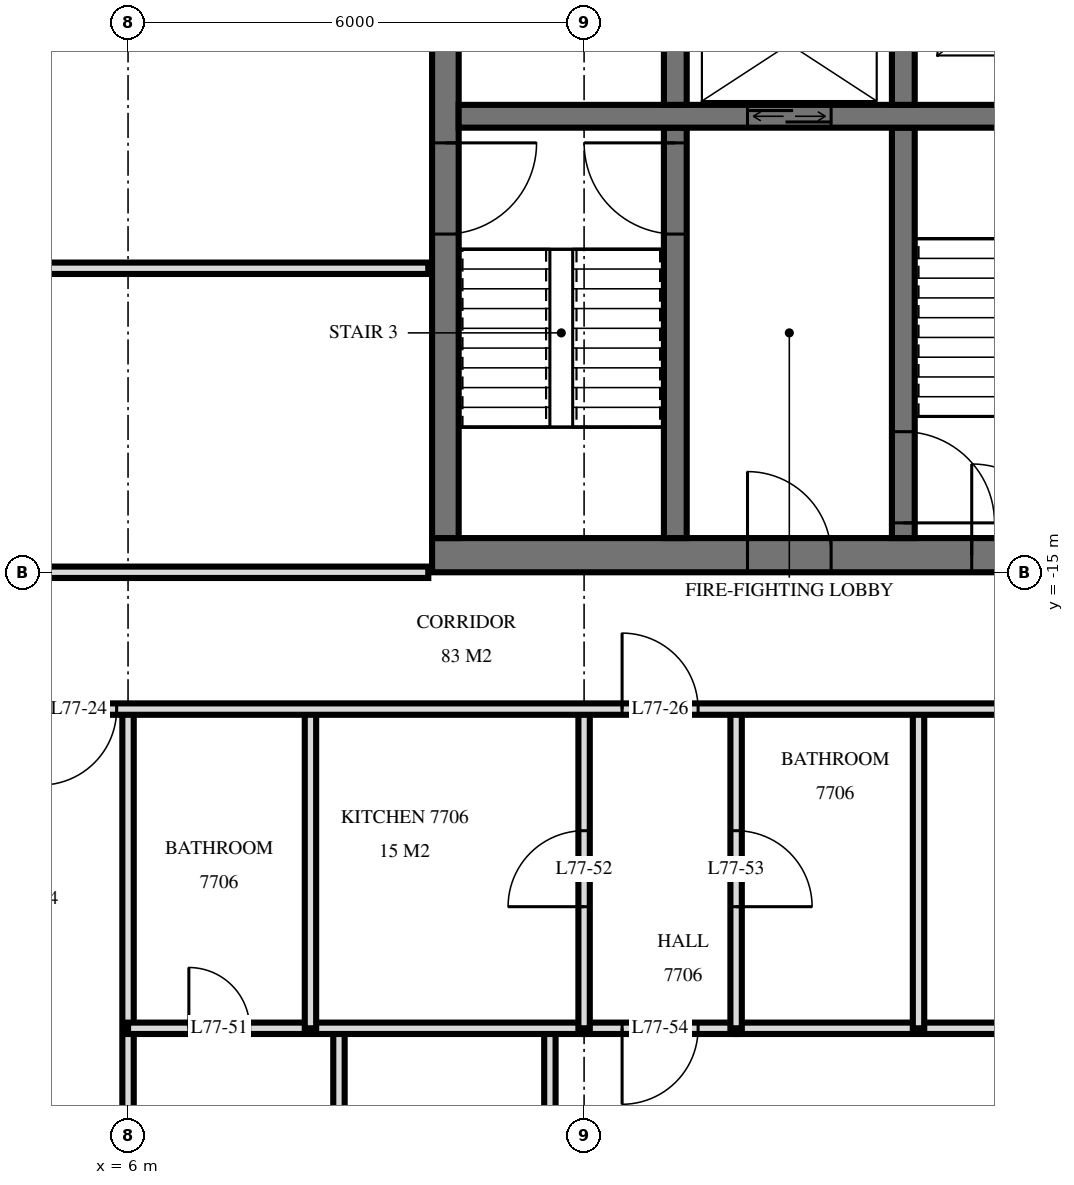
"""IFC4 building model, lengths in metres.
Left out: names, types, materials, properties, quantities, classifications, styles, units other than length and angle.
Written with IfcOpenShell. Run it as: python <this file> out.ifc"""

import sys

from ifc_helpers import new_model, si_unit, direction, frame, frame_2d, origin, place, context, subcontext, project, spatial, rectangle, extrude, element, fill, save


model = new_model("IFC4")
c1 = context("Model", 3, precision=1e-05, world=origin(), true_north=direction((0.0, 1.0)))
c2 = subcontext(c1, "Body", "Model", "MODEL_VIEW")
j1 = project(units=[si_unit("LENGTHUNIT", "METRE"), si_unit("PLANEANGLEUNIT", "RADIAN")], contexts=[c1])
p1 = place(None, origin())
s1 = spatial("IfcSite", under=j1, at=p1, CompositionType="ELEMENT")
p2 = place(p1, origin())
s2 = spatial("IfcBuilding", under=s1, at=p2, CompositionType="ELEMENT")
p3 = place(p2, frame((0.0, 0.0, 291.1)))
s3 = spatial("IfcBuildingStorey", under=s2, at=p3, CompositionType="ELEMENT", Elevation=291.1)
p4 = place(p3, frame((10.0, -14.775, 0.0), z_axis=(0.0, 0.0, 1.0), x_axis=(1.0, 0.0, 0.0)))
e1 = element("IfcWall", 1, at=p4, inside=s3, PredefinedType="SHEAR", context=c2, shape_type="SweptSolid", body=[
    extrude(rectangle(XDim=9.5, YDim=0.45, at=frame_2d((4.75, 0.0))), origin(), (0.0, 0.0, 1.0), 3.5),
])
p5 = place(p4, frame((7.1, 0.0, 0.0)))
e2 = element("IfcOpeningElement", 2, at=p5, cuts=e1, PredefinedType="OPENING", context=c2, shape_type="SweptSolid", body=[
    extrude(rectangle(XDim=1.2, YDim=2.1, at=frame_2d((0.6, 1.05))), frame((0.0, 0.235, 0.0), z_axis=(0.0, -1.0, 0.0), x_axis=(1.0, 0.0, 0.0)), (0.0, 0.0, 1.0), 0.47),
])
p6 = place(p4, frame((4.15, 0.0, 0.0)))
e3 = element("IfcOpeningElement", 3, at=p6, cuts=e1, PredefinedType="OPENING", context=c2, shape_type="SweptSolid", body=[
    extrude(rectangle(XDim=1.1, YDim=2.1, at=frame_2d((0.55, 1.05))), frame((0.0, 0.235, 0.0), z_axis=(0.0, -1.0, 0.0), x_axis=(1.0, 0.0, 0.0)), (0.0, 0.0, 1.0), 0.47),
])
p7 = place(p3, frame((10.175, -14.55, 0.0), z_axis=(0.0, 0.0, 1.0), x_axis=(0.0, 1.0, 0.0)))
e4 = element("IfcWall", 4, at=p7, inside=s3, PredefinedType="SHEAR", context=c2, shape_type="SweptSolid", body=[
    extrude(rectangle(XDim=14.1, YDim=0.35, at=frame_2d((7.05, 0.0))), origin(), (0.0, 0.0, 1.0), 3.5),
])
p8 = place(p7, frame((8.4, 0.0, 0.0)))
e5 = element("IfcOpeningElement", 5, at=p8, cuts=e4, PredefinedType="OPENING", context=c2, shape_type="SweptSolid", body=[
    extrude(rectangle(XDim=1.4, YDim=2.4, at=frame_2d((0.7, 1.2))), frame((0.0, 0.185, 0.0), z_axis=(0.0, -1.0, 0.0), x_axis=(1.0, 0.0, 0.0)), (0.0, 0.0, 1.0), 0.37),
])
p9 = place(p7, frame((10.0, 0.0, 0.0)))
e6 = element("IfcOpeningElement", 6, at=p9, cuts=e4, PredefinedType="OPENING", context=c2, shape_type="SweptSolid", body=[
    extrude(rectangle(XDim=1.4, YDim=2.4, at=frame_2d((0.7, 1.2))), frame((0.0, 0.185, 0.0), z_axis=(0.0, -1.0, 0.0), x_axis=(1.0, 0.0, 0.0)), (0.0, 0.0, 1.0), 0.37),
])
p10 = place(p7, frame((4.0, 0.0, 0.0)))
e7 = element("IfcOpeningElement", 7, at=p10, cuts=e4, PredefinedType="OPENING", context=c2, shape_type="SweptSolid", body=[
    extrude(rectangle(XDim=1.2, YDim=2.1, at=frame_2d((0.6, 1.05))), frame((0.0, 0.185, 0.0), z_axis=(0.0, -1.0, 0.0), x_axis=(1.0, 0.0, 0.0)), (0.0, 0.0, 1.0), 0.37),
])
p11 = place(p3, frame((10.35, -9.0, 0.0), z_axis=(0.0, 0.0, 1.0), x_axis=(1.0, 0.0, 0.0)))
e8 = element("IfcWall", 8, at=p11, inside=s3, PredefinedType="SHEAR", context=c2, shape_type="SweptSolid", body=[
    extrude(rectangle(XDim=8.7, YDim=0.3, at=frame_2d((4.35, 0.0))), origin(), (0.0, 0.0, 1.0), 3.5),
])
p12 = place(p11, frame((3.8, 0.0, 0.0)))
e9 = element("IfcOpeningElement", 9, at=p12, cuts=e8, PredefinedType="OPENING", context=c2, shape_type="SweptSolid", body=[
    extrude(rectangle(XDim=1.1, YDim=2.1, at=frame_2d((0.55, 1.05))), frame((0.0, 0.16, 0.0), z_axis=(0.0, -1.0, 0.0), x_axis=(1.0, 0.0, 0.0)), (0.0, 0.0, 1.0), 0.32),
])
p13 = place(p3, frame((13.2, -8.85, 0.0), z_axis=(0.0, 0.0, 1.0), x_axis=(0.0, 1.0, 0.0)))
e10 = element("IfcWall", 10, at=p13, inside=s3, PredefinedType="SHEAR", context=c2, shape_type="SweptSolid", body=[
    extrude(rectangle(XDim=2.3, YDim=0.3, at=frame_2d((1.15, 0.0))), origin(), (0.0, 0.0, 1.0), 3.5),
])
p14 = place(p3, frame((13.2, -14.55, 0.0), z_axis=(0.0, 0.0, 1.0), x_axis=(0.0, 1.0, 0.0)))
e11 = element("IfcWall", 11, at=p14, inside=s3, PredefinedType="SHEAR", context=c2, shape_type="SweptSolid", body=[
    extrude(rectangle(XDim=5.4, YDim=0.3, at=frame_2d((2.7, 0.0))), origin(), (0.0, 0.0, 1.0), 3.5),
])
p15 = place(p14, frame((4.0, 0.0, 0.0)))
e12 = element("IfcOpeningElement", 12, at=p15, cuts=e11, PredefinedType="OPENING", context=c2, shape_type="SweptSolid", body=[
    extrude(rectangle(XDim=1.2, YDim=2.1, at=frame_2d((0.6, 1.05))), frame((0.0, 0.16, 0.0), z_axis=(0.0, -1.0, 0.0), x_axis=(1.0, 0.0, 0.0)), (0.0, 0.0, 1.0), 0.32),
])
p16 = place(p3, frame((16.2, -8.85, 0.0), z_axis=(0.0, 0.0, 1.0), x_axis=(0.0, 1.0, 0.0)))
e13 = element("IfcWall", 13, at=p16, inside=s3, PredefinedType="SHEAR", context=c2, shape_type="SweptSolid", body=[
    extrude(rectangle(XDim=2.3, YDim=0.3, at=frame_2d((1.15, 0.0))), origin(), (0.0, 0.0, 1.0), 3.5),
])
p17 = place(p3, frame((16.2, -14.55, 0.0), z_axis=(0.0, 0.0, 1.0), x_axis=(0.0, 1.0, 0.0)))
e14 = element("IfcWall", 14, at=p17, inside=s3, PredefinedType="SHEAR", context=c2, shape_type="SweptSolid", body=[
    extrude(rectangle(XDim=5.4, YDim=0.3, at=frame_2d((2.7, 0.0))), origin(), (0.0, 0.0, 1.0), 3.5),
])
p18 = place(p17, frame((0.2, 0.0, 0.0)))
e15 = element("IfcOpeningElement", 15, at=p18, cuts=e14, PredefinedType="OPENING", context=c2, shape_type="SweptSolid", body=[
    extrude(rectangle(XDim=1.2, YDim=2.1, at=frame_2d((0.6, 1.05))), frame((0.0, 0.16, 0.0), z_axis=(0.0, -1.0, 0.0), x_axis=(1.0, 0.0, 0.0)), (0.0, 0.0, 1.0), 0.32),
])
p19 = place(p3, frame((16.4, -21.0, 0.0), z_axis=(0.0, 0.0, 1.0), x_axis=(0.0, 1.0, 0.0)))
e16 = element("IfcWall", 16, at=p19, inside=s3, PredefinedType="PARTITIONING", context=c2, shape_type="SweptSolid", body=[
    extrude(rectangle(XDim=4.2, YDim=0.15, at=frame_2d((2.1, 0.0))), origin(), (0.0, 0.0, 1.0), 3.22),
])
p20 = place(p3, frame((14.0, -21.0, 0.0), z_axis=(0.0, 0.0, 1.0), x_axis=(0.0, 1.0, 0.0)))
e17 = element("IfcWall", 17, at=p20, inside=s3, PredefinedType="PARTITIONING", context=c2, shape_type="SweptSolid", body=[
    extrude(rectangle(XDim=4.2, YDim=0.15, at=frame_2d((2.1, 0.0))), origin(), (0.0, 0.0, 1.0), 3.22),
])
p21 = place(p20, frame((1.6, 0.0, 0.0)))
e18 = element("IfcOpeningElement", 18, at=p21, cuts=e17, PredefinedType="OPENING", context=c2, shape_type="SweptSolid", body=[
    extrude(rectangle(XDim=1.0, YDim=2.1, at=frame_2d((0.5, 1.05))), frame((0.0, 0.085, 0.0), z_axis=(0.0, -1.0, 0.0), x_axis=(1.0, 0.0, 0.0)), (0.0, 0.0, 1.0), 0.17),
])
p22 = place(p3, frame((12.0, -21.0, 0.0), z_axis=(0.0, 0.0, 1.0), x_axis=(0.0, 1.0, 0.0)))
e19 = element("IfcWall", 19, at=p22, inside=s3, PredefinedType="PARTITIONING", context=c2, shape_type="SweptSolid", body=[
    extrude(rectangle(XDim=4.2, YDim=0.15, at=frame_2d((2.1, 0.0))), origin(), (0.0, 0.0, 1.0), 3.22),
])
p23 = place(p22, frame((1.6, 0.0, 0.0)))
e20 = element("IfcOpeningElement", 20, at=p23, cuts=e19, PredefinedType="OPENING", context=c2, shape_type="SweptSolid", body=[
    extrude(rectangle(XDim=1.0, YDim=2.1, at=frame_2d((0.5, 1.05))), frame((0.0, 0.085, 0.0), z_axis=(0.0, -1.0, 0.0), x_axis=(1.0, 0.0, 0.0)), (0.0, 0.0, 1.0), 0.17),
])
p24 = place(p3, frame((11.55, -33.62, 0.0), z_axis=(0.0, 0.0, 1.0), x_axis=(0.0, 1.0, 0.0)))
e21 = element("IfcWall", 21, at=p24, inside=s3, PredefinedType="PARTITIONING", context=c2, shape_type="SweptSolid", body=[
    extrude(rectangle(XDim=12.62, YDim=0.15, at=frame_2d((6.31, 0.0))), origin(), (0.0, 0.0, 1.0), 3.22),
])
p25 = place(p24, frame((5.79, 0.0, 0.0)))
e22 = element("IfcOpeningElement", 22, at=p25, cuts=e21, PredefinedType="OPENING", context=c2, shape_type="SweptSolid", body=[
    extrude(rectangle(XDim=0.9, YDim=2.1, at=frame_2d((0.45, 1.05))), frame((0.0, 0.085, 0.0), z_axis=(0.0, -1.0, 0.0), x_axis=(1.0, 0.0, 0.0)), (0.0, 0.0, 1.0), 0.17),
])
p26 = place(p3, frame((8.775, -33.62, 0.0), z_axis=(0.0, 0.0, 1.0), x_axis=(0.0, 1.0, 0.0)))
e23 = element("IfcWall", 23, at=p26, inside=s3, PredefinedType="PARTITIONING", context=c2, shape_type="SweptSolid", body=[
    extrude(rectangle(XDim=12.62, YDim=0.15, at=frame_2d((6.31, 0.0))), origin(), (0.0, 0.0, 1.0), 3.22),
])
p27 = place(p26, frame((5.77, 0.0, 0.0)))
e24 = element("IfcOpeningElement", 24, at=p27, cuts=e23, PredefinedType="OPENING", context=c2, shape_type="SweptSolid", body=[
    extrude(rectangle(XDim=0.9, YDim=2.1, at=frame_2d((0.45, 1.05))), frame((0.0, 0.085, 0.0), z_axis=(0.0, -1.0, 0.0), x_axis=(1.0, 0.0, 0.0)), (0.0, 0.0, 1.0), 0.17),
])
p28 = place(p3, frame((8.4, -21.0, 0.0), z_axis=(0.0, 0.0, 1.0), x_axis=(0.0, 1.0, 0.0)))
e25 = element("IfcWall", 25, at=p28, inside=s3, PredefinedType="PARTITIONING", context=c2, shape_type="SweptSolid", body=[
    extrude(rectangle(XDim=4.2, YDim=0.15, at=frame_2d((2.1, 0.0))), origin(), (0.0, 0.0, 1.0), 3.22),
])
p29 = place(p3, frame((6.0, -33.62, 0.0), z_axis=(0.0, 0.0, 1.0), x_axis=(0.0, 1.0, 0.0)))
e26 = element("IfcWall", 26, at=p29, inside=s3, PredefinedType="PARTITIONING", context=c2, shape_type="SweptSolid", body=[
    extrude(rectangle(XDim=16.82, YDim=0.15, at=frame_2d((8.41, 0.0))), origin(), (0.0, 0.0, 1.0), 3.22),
])
p30 = place(p3, frame((12.0, -21.0, 0.0), z_axis=(0.0, 0.0, 1.0), x_axis=(1.0, 0.0, 0.0)))
e27 = element("IfcWall", 27, at=p30, inside=s3, PredefinedType="PARTITIONING", context=c2, shape_type="SweptSolid", body=[
    extrude(rectangle(XDim=2.0, YDim=0.15, at=frame_2d((1.0, 0.0))), origin(), (0.0, 0.0, 1.0), 3.22),
])
p31 = place(p30, frame((0.5, 0.0, 0.0)))
e28 = element("IfcOpeningElement", 28, at=p31, cuts=e27, PredefinedType="OPENING", context=c2, shape_type="SweptSolid", body=[
    extrude(rectangle(XDim=1.0, YDim=2.1, at=frame_2d((0.5, 1.05))), frame((0.0, 0.085, 0.0), z_axis=(0.0, -1.0, 0.0), x_axis=(1.0, 0.0, 0.0)), (0.0, 0.0, 1.0), 0.17),
])
p32 = place(p3, frame((6.0, -21.0, 0.0), z_axis=(0.0, 0.0, 1.0), x_axis=(1.0, 0.0, 0.0)))
e29 = element("IfcWall", 29, at=p32, inside=s3, PredefinedType="PARTITIONING", context=c2, shape_type="SweptSolid", body=[
    extrude(rectangle(XDim=6.0, YDim=0.15, at=frame_2d((3.0, 0.0))), origin(), (0.0, 0.0, 1.0), 3.22),
])
p33 = place(p32, frame((0.8, 0.0, 0.0)))
e30 = element("IfcOpeningElement", 30, at=p33, cuts=e29, PredefinedType="OPENING", context=c2, shape_type="SweptSolid", body=[
    extrude(rectangle(XDim=0.8, YDim=2.1, at=frame_2d((0.4, 1.05))), frame((0.0, 0.085, 0.0), z_axis=(0.0, -1.0, 0.0), x_axis=(1.0, 0.0, 0.0)), (0.0, 0.0, 1.0), 0.17),
])
p34 = place(p3, frame((14.0, -21.0, 0.0), z_axis=(0.0, 0.0, 1.0), x_axis=(1.0, 0.0, 0.0)))
e31 = element("IfcWall", 31, at=p34, inside=s3, PredefinedType="PARTITIONING", context=c2, shape_type="SweptSolid", body=[
    extrude(rectangle(XDim=8.92, YDim=0.15, at=frame_2d((4.46, 0.0))), origin(), (0.0, 0.0, 1.0), 3.22),
])
p35 = place(p3, frame((-22.92, -16.8, 0.0), z_axis=(0.0, 0.0, 1.0), x_axis=(1.0, 0.0, 0.0)))
e32 = element("IfcWall", 32, at=p35, inside=s3, PredefinedType="PARTITIONING", context=c2, shape_type="SweptSolid", body=[
    extrude(rectangle(XDim=45.84, YDim=0.15, at=frame_2d((22.92, 0.0))), origin(), (0.0, 0.0, 1.0), 3.22),
])
p36 = place(p35, frame((16.72, 0.0, 0.0)))
e33 = element("IfcOpeningElement", 33, at=p36, cuts=e32, PredefinedType="OPENING", context=c2, shape_type="SweptSolid", body=[
    extrude(rectangle(XDim=1.0, YDim=2.1, at=frame_2d((0.5, 1.05))), frame((0.0, 0.085, 0.0), z_axis=(0.0, -1.0, 0.0), x_axis=(1.0, 0.0, 0.0)), (0.0, 0.0, 1.0), 0.17),
])
p37 = place(p35, frame((18.52, 0.0, 0.0)))
e34 = element("IfcOpeningElement", 34, at=p37, cuts=e32, PredefinedType="OPENING", context=c2, shape_type="SweptSolid", body=[
    extrude(rectangle(XDim=1.0, YDim=2.1, at=frame_2d((0.5, 1.05))), frame((0.0, 0.085, 0.0), z_axis=(0.0, -1.0, 0.0), x_axis=(1.0, 0.0, 0.0)), (0.0, 0.0, 1.0), 0.17),
])
p38 = place(p35, frame((21.77, 0.0, 0.0)))
e35 = element("IfcOpeningElement", 35, at=p38, cuts=e32, PredefinedType="OPENING", context=c2, shape_type="SweptSolid", body=[
    extrude(rectangle(XDim=1.0, YDim=2.1, at=frame_2d((0.5, 1.05))), frame((0.0, 0.085, 0.0), z_axis=(0.0, -1.0, 0.0), x_axis=(1.0, 0.0, 0.0)), (0.0, 0.0, 1.0), 0.17),
])
p39 = place(p35, frame((23.07, 0.0, 0.0)))
e36 = element("IfcOpeningElement", 36, at=p39, cuts=e32, PredefinedType="OPENING", context=c2, shape_type="SweptSolid", body=[
    extrude(rectangle(XDim=1.0, YDim=2.1, at=frame_2d((0.5, 1.05))), frame((0.0, 0.085, 0.0), z_axis=(0.0, -1.0, 0.0), x_axis=(1.0, 0.0, 0.0)), (0.0, 0.0, 1.0), 0.17),
])
p40 = place(p35, frame((27.77, 0.0, 0.0)))
e37 = element("IfcOpeningElement", 37, at=p40, cuts=e32, PredefinedType="OPENING", context=c2, shape_type="SweptSolid", body=[
    extrude(rectangle(XDim=1.0, YDim=2.1, at=frame_2d((0.5, 1.05))), frame((0.0, 0.085, 0.0), z_axis=(0.0, -1.0, 0.0), x_axis=(1.0, 0.0, 0.0)), (0.0, 0.0, 1.0), 0.17),
])
p41 = place(p35, frame((7.02, 0.0, 0.0)))
e38 = element("IfcOpeningElement", 38, at=p41, cuts=e32, PredefinedType="OPENING", context=c2, shape_type="SweptSolid", body=[
    extrude(rectangle(XDim=1.0, YDim=2.1, at=frame_2d((0.5, 1.05))), frame((0.0, 0.085, 0.0), z_axis=(0.0, -1.0, 0.0), x_axis=(1.0, 0.0, 0.0)), (0.0, 0.0, 1.0), 0.17),
])
p42 = place(p35, frame((35.42, 0.0, 0.0)))
e39 = element("IfcOpeningElement", 39, at=p42, cuts=e32, PredefinedType="OPENING", context=c2, shape_type="SweptSolid", body=[
    extrude(rectangle(XDim=1.0, YDim=2.1, at=frame_2d((0.5, 1.05))), frame((0.0, 0.085, 0.0), z_axis=(0.0, -1.0, 0.0), x_axis=(1.0, 0.0, 0.0)), (0.0, 0.0, 1.0), 0.17),
])
p43 = place(p35, frame((42.19, 0.0, 0.0)))
e40 = element("IfcOpeningElement", 40, at=p43, cuts=e32, PredefinedType="OPENING", context=c2, shape_type="SweptSolid", body=[
    extrude(rectangle(XDim=1.0, YDim=2.1, at=frame_2d((0.5, 1.05))), frame((0.0, 0.085, 0.0), z_axis=(0.0, -1.0, 0.0), x_axis=(1.0, 0.0, 0.0)), (0.0, 0.0, 1.0), 0.17),
])
p44 = place(p3, frame((-9.95, -15.0, 0.0), z_axis=(0.0, 0.0, 1.0), x_axis=(1.0, 0.0, 0.0)))
e41 = element("IfcWall", 41, at=p44, inside=s3, PredefinedType="PARTITIONING", context=c2, shape_type="SweptSolid", body=[
    extrude(rectangle(XDim=19.9, YDim=0.15, at=frame_2d((9.95, 0.0))), origin(), (0.0, 0.0, 1.0), 2.584),
])
p45 = place(p44, frame((9.45, 0.0, 0.0)))
e42 = element("IfcOpeningElement", 42, at=p45, cuts=e41, PredefinedType="OPENING", context=c2, shape_type="SweptSolid", body=[
    extrude(rectangle(XDim=1.0, YDim=2.1, at=frame_2d((0.5, 1.05))), frame((0.0, 0.085, 0.0), z_axis=(0.0, -1.0, 0.0), x_axis=(1.0, 0.0, 0.0)), (0.0, 0.0, 1.0), 0.17),
])
p46 = place(p3, frame((-9.95, -11.0, 0.0), z_axis=(0.0, 0.0, 1.0), x_axis=(1.0, 0.0, 0.0)))
e43 = element("IfcWall", 43, at=p46, inside=s3, PredefinedType="PARTITIONING", context=c2, shape_type="SweptSolid", body=[
    extrude(rectangle(XDim=19.9, YDim=0.15, at=frame_2d((9.95, 0.0))), origin(), (0.0, 0.0, 1.0), 3.22),
])
p47 = place(p46, frame((9.45, 0.0, 0.0)))
e44 = element("IfcOpeningElement", 44, at=p47, cuts=e43, PredefinedType="OPENING", context=c2, shape_type="SweptSolid", body=[
    extrude(rectangle(XDim=1.0, YDim=2.1, at=frame_2d((0.5, 1.05))), frame((0.0, 0.085, 0.0), z_axis=(0.0, -1.0, 0.0), x_axis=(1.0, 0.0, 0.0)), (0.0, 0.0, 1.0), 0.17),
])
p48 = place(p46, frame((3.45, 0.0, 0.0)))
e45 = element("IfcOpeningElement", 45, at=p48, cuts=e43, PredefinedType="OPENING", context=c2, shape_type="SweptSolid", body=[
    extrude(rectangle(XDim=1.0, YDim=2.1, at=frame_2d((0.5, 1.05))), frame((0.0, 0.085, 0.0), z_axis=(0.0, -1.0, 0.0), x_axis=(1.0, 0.0, 0.0)), (0.0, 0.0, 1.0), 0.17),
])
p49 = place(p12, origin())
e46 = element("IfcDoor", 46, at=p49, inside=s3, OperationType="DOUBLE_DOOR_SLIDING", PredefinedType="USERDEFINED", context=c2, shape_type="SweptSolid", body=[
    extrude(rectangle(XDim=1.1, YDim=2.1, at=frame_2d((0.55, 1.05))), frame((0.0, 0.025, 0.0), z_axis=(0.0, -1.0, 0.0), x_axis=(1.0, 0.0, 0.0)), (0.0, 0.0, 1.0), 0.05),
])
fill(e9, e46)
p50 = place(p10, frame((0.6, 0.0, 0.0), z_axis=(0.0, 0.0, 1.0), x_axis=(-1.0, 0.0, 0.0)))
e47 = element("IfcDoor", 47, at=p50, inside=s3, OperationType="SINGLE_SWING_RIGHT", PredefinedType="DOOR", context=c2, shape_type="SweptSolid", body=[
    extrude(rectangle(XDim=1.2, YDim=2.1, at=frame_2d((0.0, 1.05))), frame((0.0, -0.025, 0.0), z_axis=(0.0, 1.0, 0.0), x_axis=(-1.0, 0.0, 0.0)), (0.0, 0.0, 1.0), 0.05),
])
fill(e7, e47)
p51 = place(p5, origin())
e48 = element("IfcDoor", 48, at=p51, inside=s3, OperationType="SINGLE_SWING_RIGHT", PredefinedType="DOOR", context=c2, shape_type="SweptSolid", body=[
    extrude(rectangle(XDim=1.2, YDim=2.1, at=frame_2d((0.6, 1.05))), frame((0.0, 0.025, 0.0), z_axis=(0.0, -1.0, 0.0), x_axis=(1.0, 0.0, 0.0)), (0.0, 0.0, 1.0), 0.05),
])
fill(e2, e48)
p52 = place(p6, origin())
e49 = element("IfcDoor", 49, at=p52, inside=s3, OperationType="SINGLE_SWING_RIGHT", PredefinedType="DOOR", context=c2, shape_type="SweptSolid", body=[
    extrude(rectangle(XDim=1.1, YDim=2.1, at=frame_2d((0.55, 1.05))), frame((0.0, 0.025, 0.0), z_axis=(0.0, -1.0, 0.0), x_axis=(1.0, 0.0, 0.0)), (0.0, 0.0, 1.0), 0.05),
])
fill(e3, e49)
p53 = place(p15, origin())
e50 = element("IfcDoor", 50, at=p53, inside=s3, OperationType="SINGLE_SWING_LEFT", PredefinedType="DOOR", context=c2, shape_type="SweptSolid", body=[
    extrude(rectangle(XDim=1.2, YDim=2.1, at=frame_2d((0.6, 1.05))), frame((0.0, 0.025, 0.0), z_axis=(0.0, -1.0, 0.0), x_axis=(1.0, 0.0, 0.0)), (0.0, 0.0, 1.0), 0.05),
])
fill(e12, e50)
p54 = place(p18, frame((0.6, 0.0, 0.0), z_axis=(0.0, 0.0, 1.0), x_axis=(-1.0, 0.0, 0.0)))
e51 = element("IfcDoor", 51, at=p54, inside=s3, OperationType="SINGLE_SWING_LEFT", PredefinedType="DOOR", context=c2, shape_type="SweptSolid", body=[
    extrude(rectangle(XDim=1.2, YDim=2.1, at=frame_2d((0.0, 1.05))), frame((0.0, -0.025, 0.0), z_axis=(0.0, 1.0, 0.0), x_axis=(-1.0, 0.0, 0.0)), (0.0, 0.0, 1.0), 0.05),
])
fill(e15, e51)
p55 = place(p40, frame((0.5, 0.0, 0.0), z_axis=(0.0, 0.0, 1.0), x_axis=(-1.0, 0.0, 0.0)))
e52 = element("IfcDoor", 52, at=p55, inside=s3, OperationType="SINGLE_SWING_LEFT", PredefinedType="DOOR", context=c2, shape_type="SweptSolid", body=[
    extrude(rectangle(XDim=1.0, YDim=2.1, at=frame_2d((0.0, 1.05))), frame((0.0, -0.025, 0.0), z_axis=(0.0, 1.0, 0.0), x_axis=(-1.0, 0.0, 0.0)), (0.0, 0.0, 1.0), 0.05),
])
fill(e37, e52)
p56 = place(p42, origin())
e53 = element("IfcDoor", 53, at=p56, inside=s3, OperationType="SINGLE_SWING_RIGHT", PredefinedType="DOOR", context=c2, shape_type="SweptSolid", body=[
    extrude(rectangle(XDim=1.0, YDim=2.1, at=frame_2d((0.5, 1.05))), frame((0.0, 0.025, 0.0), z_axis=(0.0, -1.0, 0.0), x_axis=(1.0, 0.0, 0.0)), (0.0, 0.0, 1.0), 0.05),
])
fill(e39, e53)
p57 = place(p33, origin())
e54 = element("IfcDoor", 54, at=p57, inside=s3, OperationType="SINGLE_SWING_RIGHT", PredefinedType="DOOR", context=c2, shape_type="SweptSolid", body=[
    extrude(rectangle(XDim=0.8, YDim=2.1, at=frame_2d((0.4, 1.05))), frame((0.0, 0.025, 0.0), z_axis=(0.0, -1.0, 0.0), x_axis=(1.0, 0.0, 0.0)), (0.0, 0.0, 1.0), 0.05),
])
fill(e30, e54)
p58 = place(p23, origin())
e55 = element("IfcDoor", 55, at=p58, inside=s3, OperationType="SINGLE_SWING_RIGHT", PredefinedType="DOOR", context=c2, shape_type="SweptSolid", body=[
    extrude(rectangle(XDim=1.0, YDim=2.1, at=frame_2d((0.5, 1.05))), frame((0.0, 0.025, 0.0), z_axis=(0.0, -1.0, 0.0), x_axis=(1.0, 0.0, 0.0)), (0.0, 0.0, 1.0), 0.05),
])
fill(e20, e55)
p59 = place(p21, frame((0.5, 0.0, 0.0), z_axis=(0.0, 0.0, 1.0), x_axis=(-1.0, 0.0, 0.0)))
e56 = element("IfcDoor", 56, at=p59, inside=s3, OperationType="SINGLE_SWING_LEFT", PredefinedType="DOOR", context=c2, shape_type="SweptSolid", body=[
    extrude(rectangle(XDim=1.0, YDim=2.1, at=frame_2d((0.0, 1.05))), frame((0.0, -0.025, 0.0), z_axis=(0.0, 1.0, 0.0), x_axis=(-1.0, 0.0, 0.0)), (0.0, 0.0, 1.0), 0.05),
])
fill(e18, e56)
p60 = place(p31, frame((0.5, 0.0, 0.0), z_axis=(0.0, 0.0, 1.0), x_axis=(-1.0, 0.0, 0.0)))
e57 = element("IfcDoor", 57, at=p60, inside=s3, OperationType="SINGLE_SWING_LEFT", PredefinedType="DOOR", context=c2, shape_type="SweptSolid", body=[
    extrude(rectangle(XDim=1.0, YDim=2.1, at=frame_2d((0.0, 1.05))), frame((0.0, -0.025, 0.0), z_axis=(0.0, 1.0, 0.0), x_axis=(-1.0, 0.0, 0.0)), (0.0, 0.0, 1.0), 0.05),
])
fill(e28, e57)
save(model, sys.argv[1])
